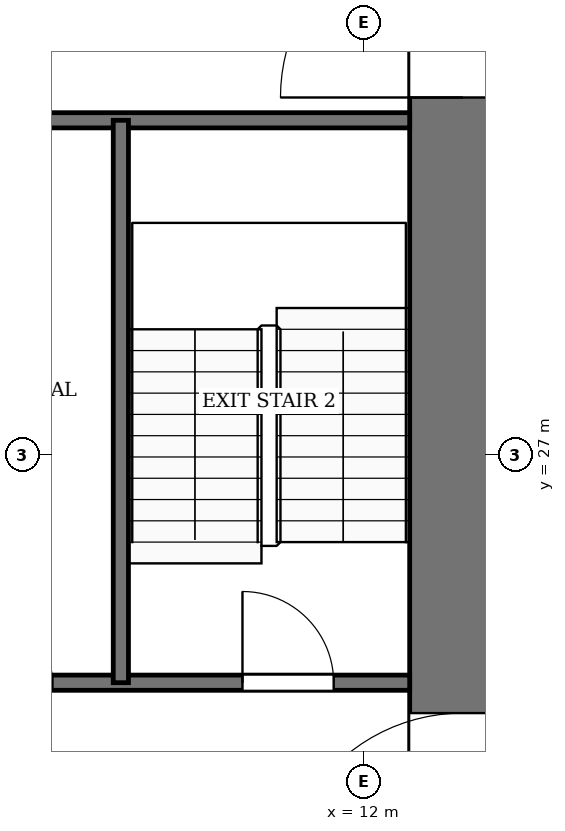
"""IFC4 building model, lengths in metres.
Left out: names, types, materials, properties, quantities, classifications, styles, units other than length and angle.
Written with IfcOpenShell. Run it as: python <this file> out.ifc"""

import sys

from ifc_helpers import new_model, si_unit, direction, frame, frame_2d, origin, place, context, subcontext, project, spatial, rectangle, extrude, element, fill, save


model = new_model("IFC4")
c1 = context("Model", 3, precision=1e-05, world=origin(), true_north=direction((0.0, 1.0)))
c2 = subcontext(c1, "Body", "Model", "MODEL_VIEW")
j1 = project(units=[si_unit("LENGTHUNIT", "METRE"), si_unit("PLANEANGLEUNIT", "RADIAN")], contexts=[c1])
p1 = place(None, origin())
s1 = spatial("IfcSite", under=j1, at=p1, CompositionType="ELEMENT")
p2 = place(p1, origin())
s2 = spatial("IfcBuilding", under=s1, at=p2, CompositionType="ELEMENT")
p3 = place(p2, frame((0.0, 0.0, 14.0)))
s3 = spatial("IfcBuildingStorey", under=s2, at=p3, CompositionType="ELEMENT", Elevation=14.0)
p4 = place(p3, frame((13.3, 18.4, -0.13), z_axis=(0.0, 0.0, 1.0), x_axis=(0.0, 1.0, 0.0)))
e1 = element("IfcWall", 1, at=p4, inside=s3, PredefinedType="SHEAR", context=c2, shape_type="SweptSolid", body=[
    extrude(rectangle(XDim=19.2, YDim=1.4, at=frame_2d((9.6, 0.0))), origin(), (0.0, 0.0, 1.0), 4.0),
])
p5 = place(p4, frame((2.8, 0.0, 0.13)))
e2 = element("IfcOpeningElement", 2, at=p5, cuts=e1, PredefinedType="OPENING", context=c2, shape_type="SweptSolid", body=[
    extrude(rectangle(XDim=2.4, YDim=2.4, at=frame_2d((1.2, 1.2))), frame((0.0, 0.71, 0.0), z_axis=(0.0, -1.0, 0.0), x_axis=(1.0, 0.0, 0.0)), (0.0, 0.0, 1.0), 1.42),
])
p6 = place(p4, frame((13.3, 0.0, 0.13)))
e3 = element("IfcOpeningElement", 3, at=p6, cuts=e1, PredefinedType="OPENING", context=c2, shape_type="SweptSolid", body=[
    extrude(rectangle(XDim=2.4, YDim=2.4, at=frame_2d((1.2, 1.2))), frame((0.0, 0.71, 0.0), z_axis=(0.0, -1.0, 0.0), x_axis=(1.0, 0.0, 0.0)), (0.0, 0.0, 1.0), 1.42),
])
p7 = place(p3, frame((6.0, 24.0, 0.0), z_axis=(0.0, 0.0, 1.0), x_axis=(1.0, 0.0, 0.0)))
e4 = element("IfcWall", 4, at=p7, inside=s3, PredefinedType="PARTITIONING", context=c2, shape_type="SweptSolid", body=[
    extrude(rectangle(XDim=6.6, YDim=0.2, at=frame_2d((3.3, 0.0))), origin(), (0.0, 0.0, 1.0), 3.87),
])
p8 = place(p7, frame((0.9, 0.0, 0.0)))
e5 = element("IfcOpeningElement", 5, at=p8, cuts=e4, PredefinedType="OPENING", context=c2, shape_type="SweptSolid", body=[
    extrude(rectangle(XDim=1.0, YDim=2.1, at=frame_2d((0.5, 1.05))), frame((0.0, 0.11, 0.0), z_axis=(0.0, -1.0, 0.0), x_axis=(1.0, 0.0, 0.0)), (0.0, 0.0, 1.0), 0.22),
])
p9 = place(p7, frame((4.4, 0.0, 0.0)))
e6 = element("IfcOpeningElement", 6, at=p9, cuts=e4, PredefinedType="OPENING", context=c2, shape_type="SweptSolid", body=[
    extrude(rectangle(XDim=1.2, YDim=2.2, at=frame_2d((0.6, 1.1))), frame((0.0, 0.11, 0.0), z_axis=(0.0, -1.0, 0.0), x_axis=(1.0, 0.0, 0.0)), (0.0, 0.0, 1.0), 0.22),
])
p10 = place(p3, frame((6.0, 31.4, 0.0), z_axis=(0.0, 0.0, 1.0), x_axis=(1.0, 0.0, 0.0)))
e7 = element("IfcWall", 7, at=p10, inside=s3, PredefinedType="PARTITIONING", context=c2, shape_type="SweptSolid", body=[
    extrude(rectangle(XDim=6.6, YDim=0.2, at=frame_2d((3.3, 0.0))), origin(), (0.0, 0.0, 1.0), 3.87),
])
p11 = place(p3, frame((8.8, 24.0, 0.0), z_axis=(0.0, 0.0, 1.0), x_axis=(0.0, 1.0, 0.0)))
e8 = element("IfcWall", 8, at=p11, inside=s3, PredefinedType="PARTITIONING", context=c2, shape_type="SweptSolid", body=[
    extrude(rectangle(XDim=7.4, YDim=0.2, at=frame_2d((3.7, 0.0))), origin(), (0.0, 0.0, 1.0), 3.87),
])
p12 = place(p9, origin())
e9 = element("IfcDoor", 9, at=p12, inside=s3, OperationType="SINGLE_SWING_LEFT", PredefinedType="DOOR", context=c2, shape_type="SweptSolid", body=[
    extrude(rectangle(XDim=1.2, YDim=2.2, at=frame_2d((0.6, 1.1))), frame((0.0, 0.025, 0.0), z_axis=(0.0, -1.0, 0.0), x_axis=(1.0, 0.0, 0.0)), (0.0, 0.0, 1.0), 0.05),
])
fill(e6, e9)
p13 = place(p5, origin())
e10 = element("IfcDoor", 10, at=p13, inside=s3, OperationType="DOUBLE_DOOR_SINGLE_SWING", PredefinedType="DOOR", context=c2, shape_type="SweptSolid", body=[
    extrude(rectangle(XDim=2.4, YDim=2.4, at=frame_2d((1.2, 1.2))), frame((0.0, 0.025, 0.0), z_axis=(0.0, -1.0, 0.0), x_axis=(1.0, 0.0, 0.0)), (0.0, 0.0, 1.0), 0.05),
])
fill(e2, e10)
p14 = place(p6, origin())
e11 = element("IfcDoor", 11, at=p14, inside=s3, OperationType="DOUBLE_DOOR_SINGLE_SWING", PredefinedType="DOOR", context=c2, shape_type="SweptSolid", body=[
    extrude(rectangle(XDim=2.4, YDim=2.4, at=frame_2d((1.2, 1.2))), frame((0.0, 0.025, 0.0), z_axis=(0.0, -1.0, 0.0), x_axis=(1.0, 0.0, 0.0)), (0.0, 0.0, 1.0), 0.05),
])
fill(e3, e11)
save(model, sys.argv[1])
